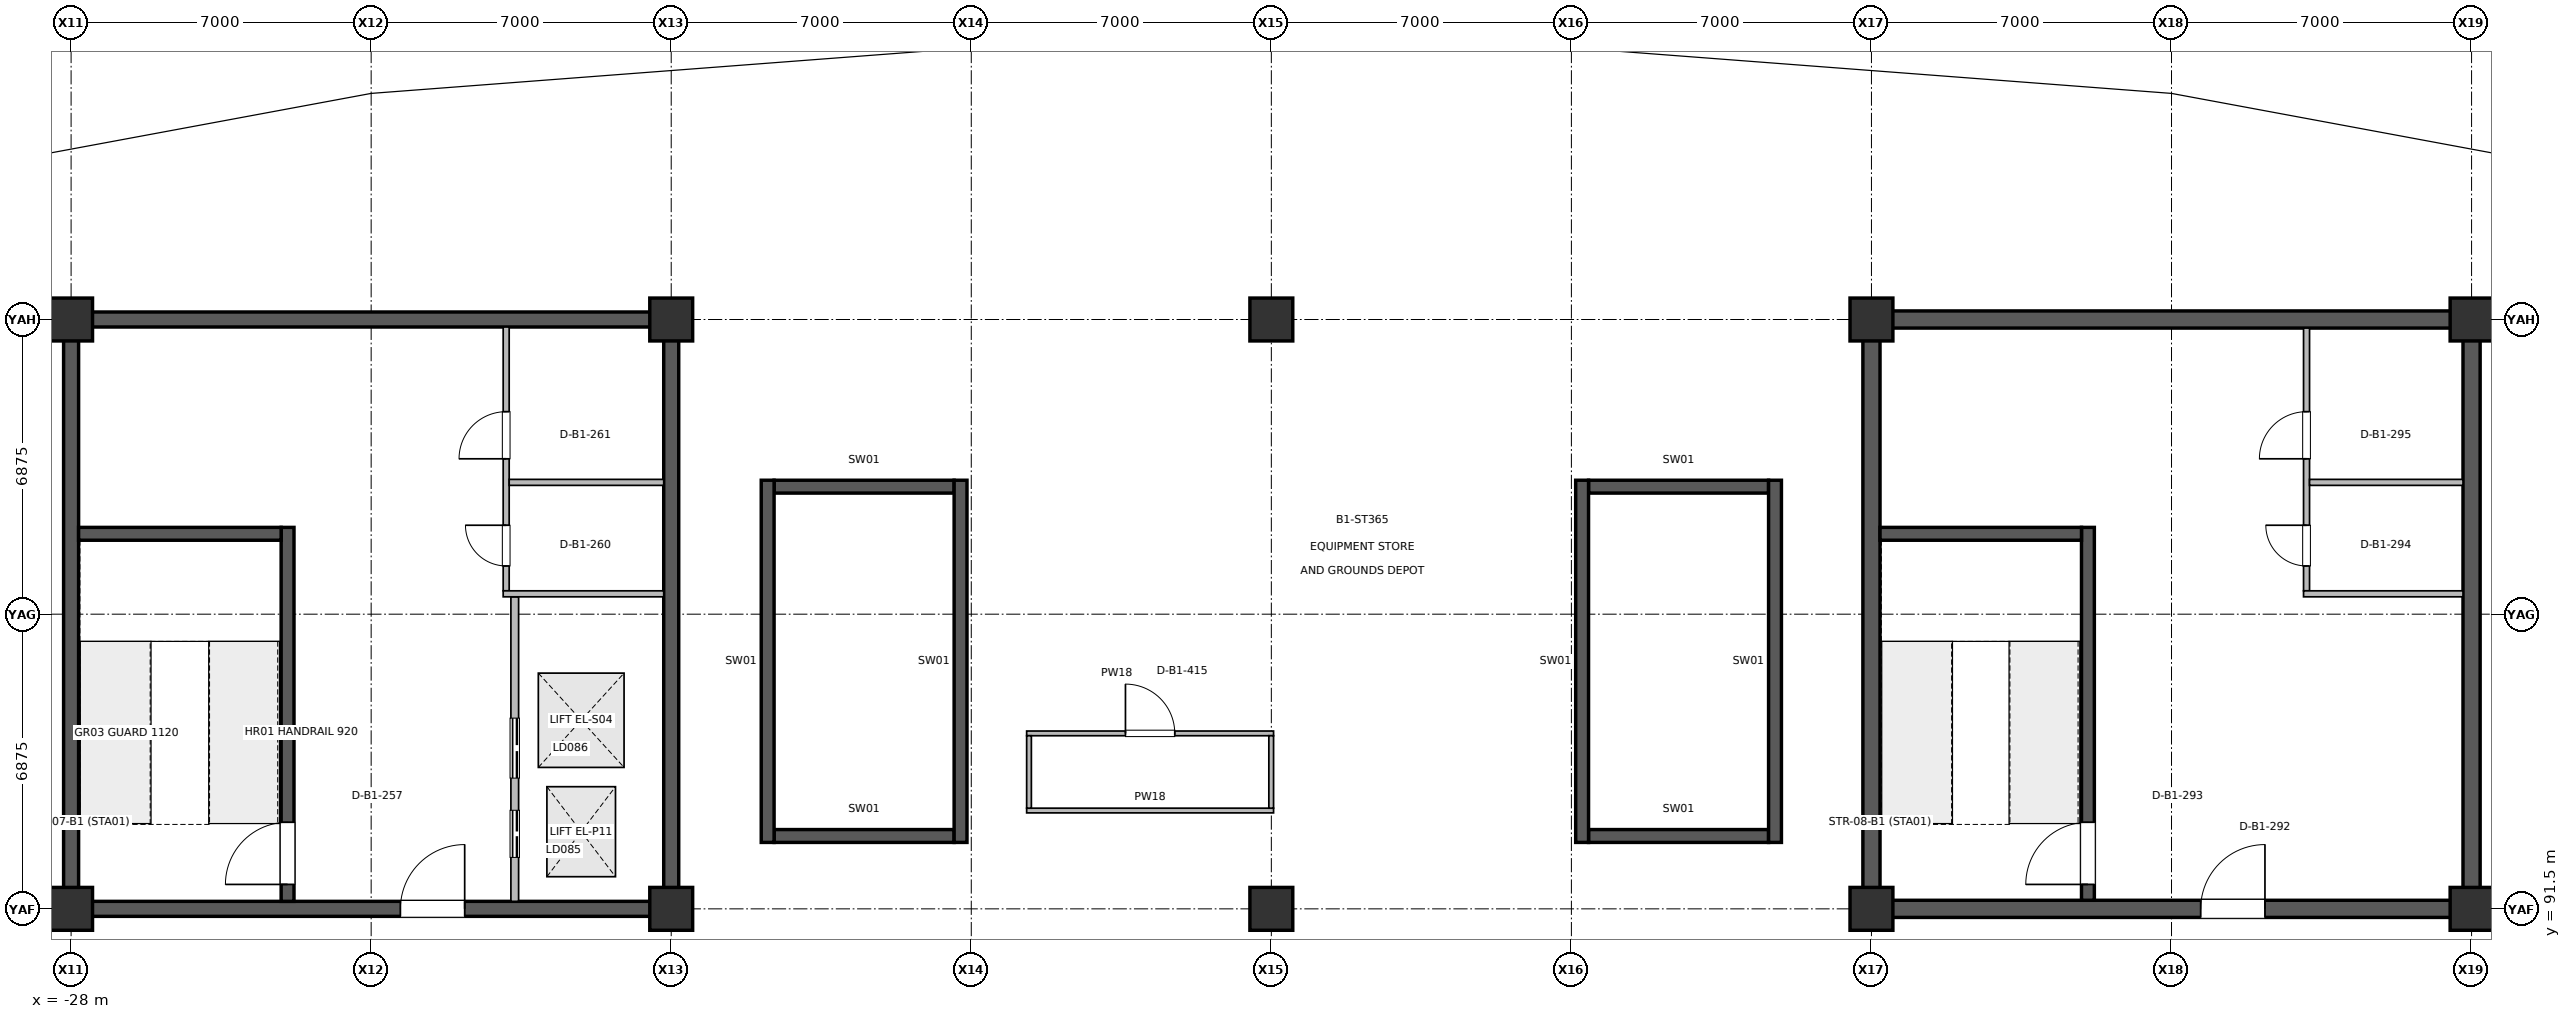
"""IFC4 building model, lengths in metres.
Left out: names, types, materials, properties, quantities, classifications, styles, units other than length and angle.
Written with IfcOpenShell. Run it as: python <this file> out.ifc"""

import sys

from ifc_helpers import new_model, si_unit, direction, frame, frame_2d, origin, origin_2d, place, context, subcontext, project, spatial, rectangle, circle, extrude, element, fill, save


model = new_model("IFC4")
c1 = context("Model", 3, precision=1e-05, world=origin(), true_north=direction((0.0, 1.0)))
c2 = subcontext(c1, "Body", "Model", "MODEL_VIEW")
j1 = project(units=[si_unit("LENGTHUNIT", "METRE"), si_unit("PLANEANGLEUNIT", "RADIAN")], contexts=[c1])
p1 = place(None, origin())
s1 = spatial("IfcSite", under=j1, at=p1, CompositionType="ELEMENT")
p2 = place(p1, origin())
s2 = spatial("IfcBuilding", under=s1, at=p2, CompositionType="ELEMENT")
p3 = place(p2, frame((0.0, 0.0, -6.0)))
s3 = spatial("IfcBuildingStorey", under=s2, at=p3, CompositionType="ELEMENT", Elevation=-6.0)
for number, where, z_axis, x_axis in (
    (1, (-28.0, 91.5, 0.0), (0.0, 0.0, 1.0), (1.0, 0.0, 0.0)),
    (2, (-28.0, 105.25, 0.0), (0.0, 0.0, 1.0), (1.0, 0.0, 0.0)),
    (3, (-14.0, 91.5, 0.0), (0.0, 0.0, 1.0), (1.0, 0.0, 0.0)),
    (4, (-14.0, 105.25, 0.0), (0.0, 0.0, 1.0), (1.0, 0.0, 0.0)),
    (5, (0.0, 91.5, 0.0), (0.0, 0.0, 1.0), (1.0, 0.0, 0.0)),
    (6, (0.0, 105.25, 0.0), (0.0, 0.0, 1.0), (1.0, 0.0, 0.0)),
    (7, (14.0, 91.5, 0.0), (0.0, 0.0, 1.0), (1.0, 0.0, 0.0)),
    (8, (14.0, 105.25, 0.0), (0.0, 0.0, 1.0), (1.0, 0.0, 0.0)),
    (9, (28.0, 91.5, 0.0), (0.0, 0.0, 1.0), (1.0, 0.0, 0.0)),
    (10, (28.0, 105.25, 0.0), (0.0, 0.0, 1.0), (1.0, 0.0, 0.0)),
):
    element("IfcColumn", number, at=place(p3, frame(where, z_axis=z_axis, x_axis=x_axis)), inside=s3, PredefinedType="COLUMN", context=c2, shape_type="SweptSolid", body=[
        extrude(circle(Radius=0.5, at=origin_2d()), origin(), (0.0, 0.0, 1.0), 5.998),
    ])
for number, where, z_axis, x_axis in (
    (11, (-28.0, 91.675, 0.0), (0.0, 0.0, 1.0), (0.0, 1.0, 0.0)),
    (12, (-14.0, 91.675, 0.0), (0.0, 0.0, 1.0), (0.0, 1.0, 0.0)),
):
    element("IfcWall", number, at=place(p3, frame(where, z_axis=z_axis, x_axis=x_axis)), inside=s3, PredefinedType="SHEAR", context=c2, shape_type="SweptSolid", body=[
        extrude(rectangle(XDim=13.4, YDim=0.35, at=frame_2d((6.7, 0.0))), origin(), (0.0, 0.0, 1.0), 5.75),
    ])
p4 = place(p3, frame((-27.825, 91.5, 0.0), z_axis=(0.0, 0.0, 1.0), x_axis=(1.0, 0.0, 0.0)))
e13 = element("IfcWall", 13, at=p4, inside=s3, PredefinedType="SHEAR", context=c2, shape_type="SweptSolid", body=[
    extrude(rectangle(XDim=13.65, YDim=0.35, at=frame_2d((6.825, 0.0))), origin(), (0.0, 0.0, 1.0), 5.75),
])
p5 = place(p4, frame((7.507, 0.0, 0.0)))
e14 = element("IfcOpeningElement", 14, at=p5, cuts=e13, PredefinedType="OPENING", context=c2, shape_type="SweptSolid", body=[
    extrude(rectangle(XDim=1.5, YDim=2.2, at=frame_2d((0.75, 1.1))), frame((0.0, 0.185, 0.0), z_axis=(0.0, -1.0, 0.0), x_axis=(1.0, 0.0, 0.0)), (0.0, 0.0, 1.0), 0.37),
])
p6 = place(p3, frame((-27.825, 105.25, 0.0), z_axis=(0.0, 0.0, 1.0), x_axis=(1.0, 0.0, 0.0)))
e15 = element("IfcWall", 15, at=p6, inside=s3, PredefinedType="SHEAR", context=c2, shape_type="SweptSolid", body=[
    extrude(rectangle(XDim=13.65, YDim=0.35, at=frame_2d((6.825, 0.0))), origin(), (0.0, 0.0, 1.0), 5.75),
])
for number, where, z_axis, x_axis in (
    (16, (14.0, 91.7, 0.0), (0.0, 0.0, 1.0), (0.0, 1.0, 0.0)),
    (17, (28.0, 91.7, 0.0), (0.0, 0.0, 1.0), (0.0, 1.0, 0.0)),
):
    element("IfcWall", number, at=place(p3, frame(where, z_axis=z_axis, x_axis=x_axis)), inside=s3, PredefinedType="SHEAR", context=c2, shape_type="SweptSolid", body=[
        extrude(rectangle(XDim=13.35, YDim=0.4, at=frame_2d((6.675, 0.0))), origin(), (0.0, 0.0, 1.0), 5.75),
    ])
p7 = place(p3, frame((14.2, 91.5, 0.0), z_axis=(0.0, 0.0, 1.0), x_axis=(1.0, 0.0, 0.0)))
e18 = element("IfcWall", 18, at=p7, inside=s3, PredefinedType="SHEAR", context=c2, shape_type="SweptSolid", body=[
    extrude(rectangle(XDim=13.6, YDim=0.4, at=frame_2d((6.8, 0.0))), origin(), (0.0, 0.0, 1.0), 5.75),
])
p8 = place(p7, frame((7.48, 0.0, 0.0)))
e19 = element("IfcOpeningElement", 19, at=p8, cuts=e18, PredefinedType="OPENING", context=c2, shape_type="SweptSolid", body=[
    extrude(rectangle(XDim=1.5, YDim=2.2, at=frame_2d((0.75, 1.1))), frame((0.0, 0.21, 0.0), z_axis=(0.0, -1.0, 0.0), x_axis=(1.0, 0.0, 0.0)), (0.0, 0.0, 1.0), 0.42),
])
p9 = place(p3, frame((14.2, 105.25, 0.0), z_axis=(0.0, 0.0, 1.0), x_axis=(1.0, 0.0, 0.0)))
e20 = element("IfcWall", 20, at=p9, inside=s3, PredefinedType="SHEAR", context=c2, shape_type="SweptSolid", body=[
    extrude(rectangle(XDim=13.6, YDim=0.4, at=frame_2d((6.8, 0.0))), origin(), (0.0, 0.0, 1.0), 5.75),
])
p10 = place(p3, frame((-22.95, 91.675, 0.0), z_axis=(0.0, 0.0, 1.0), x_axis=(0.0, 1.0, 0.0)))
e21 = element("IfcWall", 21, at=p10, inside=s3, PredefinedType="SHEAR", context=c2, shape_type="SweptSolid", body=[
    extrude(rectangle(XDim=8.725, YDim=0.3, at=frame_2d((4.362, 0.0))), origin(), (0.0, 0.0, 1.0), 5.75),
])
p11 = place(p10, frame((0.395, 0.0, 0.0)))
e22 = element("IfcOpeningElement", 22, at=p11, cuts=e21, PredefinedType="OPENING", context=c2, shape_type="SweptSolid", body=[
    extrude(rectangle(XDim=1.45, YDim=2.2, at=frame_2d((0.725, 1.1))), frame((0.0, 0.16, 0.0), z_axis=(0.0, -1.0, 0.0), x_axis=(1.0, 0.0, 0.0)), (0.0, 0.0, 1.0), 0.32),
])
p12 = place(p3, frame((-17.65, 91.675, 0.0), z_axis=(0.0, 0.0, 1.0), x_axis=(0.0, 1.0, 0.0)))
e23 = element("IfcWall", 23, at=p12, inside=s3, PredefinedType="PARTITIONING", context=c2, shape_type="SweptSolid", body=[
    extrude(rectangle(XDim=7.105, YDim=0.18, at=frame_2d((3.552, 0.0))), origin(), (0.0, 0.0, 1.0), 5.02),
])
p13 = place(p12, frame((1.025, 0.0, 0.0)))
e24 = element("IfcOpeningElement", 24, at=p13, cuts=e23, PredefinedType="OPENING", context=c2, shape_type="SweptSolid", body=[
    extrude(rectangle(XDim=1.1, YDim=2.2, at=frame_2d((0.55, 1.1))), frame((0.0, 0.1, 0.0), z_axis=(0.0, -1.0, 0.0), x_axis=(1.0, 0.0, 0.0)), (0.0, 0.0, 1.0), 0.2),
])
p14 = place(p12, frame((2.875, 0.0, 0.0)))
e25 = element("IfcOpeningElement", 25, at=p14, cuts=e23, PredefinedType="OPENING", context=c2, shape_type="SweptSolid", body=[
    extrude(rectangle(XDim=1.4, YDim=2.3, at=frame_2d((0.7, 1.15))), frame((0.0, 0.1, 0.0), z_axis=(0.0, -1.0, 0.0), x_axis=(1.0, 0.0, 0.0)), (0.0, 0.0, 1.0), 0.2),
])
p15 = place(p3, frame((-17.85, 98.92, 0.0), z_axis=(0.0, 0.0, 1.0), x_axis=(0.0, 1.0, 0.0)))
e26 = element("IfcWall", 26, at=p15, inside=s3, PredefinedType="PARTITIONING", context=c2, shape_type="SweptSolid", body=[
    extrude(rectangle(XDim=6.155, YDim=0.14, at=frame_2d((3.078, 0.0))), origin(), (0.0, 0.0, 1.0), 5.02),
])
p16 = place(p15, frame((0.58, 0.0, 0.0)))
e27 = element("IfcOpeningElement", 27, at=p16, cuts=e26, PredefinedType="OPENING", context=c2, shape_type="SweptSolid", body=[
    extrude(rectangle(XDim=0.95, YDim=2.15, at=frame_2d((0.475, 1.075))), frame((0.0, 0.08, 0.0), z_axis=(0.0, -1.0, 0.0), x_axis=(1.0, 0.0, 0.0)), (0.0, 0.0, 1.0), 0.16),
])
p17 = place(p15, frame((3.08, 0.0, 0.0)))
e28 = element("IfcOpeningElement", 28, at=p17, cuts=e26, PredefinedType="OPENING", context=c2, shape_type="SweptSolid", body=[
    extrude(rectangle(XDim=1.1, YDim=2.15, at=frame_2d((0.55, 1.075))), frame((0.0, 0.08, 0.0), z_axis=(0.0, -1.0, 0.0), x_axis=(1.0, 0.0, 0.0)), (0.0, 0.0, 1.0), 0.16),
])
p18 = place(p3, frame((19.05, 91.7, 0.0), z_axis=(0.0, 0.0, 1.0), x_axis=(0.0, 1.0, 0.0)))
e29 = element("IfcWall", 29, at=p18, inside=s3, PredefinedType="SHEAR", context=c2, shape_type="SweptSolid", body=[
    extrude(rectangle(XDim=8.7, YDim=0.3, at=frame_2d((4.35, 0.0))), origin(), (0.0, 0.0, 1.0), 5.75),
])
p19 = place(p18, frame((0.37, 0.0, 0.0)))
e30 = element("IfcOpeningElement", 30, at=p19, cuts=e29, PredefinedType="OPENING", context=c2, shape_type="SweptSolid", body=[
    extrude(rectangle(XDim=1.45, YDim=2.2, at=frame_2d((0.725, 1.1))), frame((0.0, 0.16, 0.0), z_axis=(0.0, -1.0, 0.0), x_axis=(1.0, 0.0, 0.0)), (0.0, 0.0, 1.0), 0.32),
])
p20 = place(p3, frame((24.15, 98.92, 0.0), z_axis=(0.0, 0.0, 1.0), x_axis=(0.0, 1.0, 0.0)))
e31 = element("IfcWall", 31, at=p20, inside=s3, PredefinedType="PARTITIONING", context=c2, shape_type="SweptSolid", body=[
    extrude(rectangle(XDim=6.13, YDim=0.14, at=frame_2d((3.065, 0.0))), origin(), (0.0, 0.0, 1.0), 5.02),
])
p21 = place(p20, frame((0.58, 0.0, 0.0)))
e32 = element("IfcOpeningElement", 32, at=p21, cuts=e31, PredefinedType="OPENING", context=c2, shape_type="SweptSolid", body=[
    extrude(rectangle(XDim=0.95, YDim=2.15, at=frame_2d((0.475, 1.075))), frame((0.0, 0.08, 0.0), z_axis=(0.0, -1.0, 0.0), x_axis=(1.0, 0.0, 0.0)), (0.0, 0.0, 1.0), 0.16),
])
p22 = place(p20, frame((3.08, 0.0, 0.0)))
e33 = element("IfcOpeningElement", 33, at=p22, cuts=e31, PredefinedType="OPENING", context=c2, shape_type="SweptSolid", body=[
    extrude(rectangle(XDim=1.1, YDim=2.15, at=frame_2d((0.55, 1.075))), frame((0.0, 0.08, 0.0), z_axis=(0.0, -1.0, 0.0), x_axis=(1.0, 0.0, 0.0)), (0.0, 0.0, 1.0), 0.16),
])
p23 = place(p3, frame((-5.708, 95.594, 0.0), z_axis=(0.0, 0.0, 1.0), x_axis=(1.0, 0.0, 0.0)))
e34 = element("IfcWall", 34, at=p23, inside=s3, PredefinedType="PARTITIONING", context=c2, shape_type="SweptSolid", body=[
    extrude(rectangle(XDim=5.76, YDim=0.11, at=frame_2d((2.88, 0.0))), origin(), (0.0, 0.0, 1.0), 5.02),
])
p24 = place(p23, frame((2.305, 0.0, 0.0)))
e35 = element("IfcOpeningElement", 35, at=p24, cuts=e34, PredefinedType="OPENING", context=c2, shape_type="SweptSolid", body=[
    extrude(rectangle(XDim=1.15, YDim=2.2, at=frame_2d((0.575, 1.1))), frame((0.0, 0.065, 0.0), z_axis=(0.0, -1.0, 0.0), x_axis=(1.0, 0.0, 0.0)), (0.0, 0.0, 1.0), 0.13),
])
p25 = place(p3, frame((-17.92, 98.85, 0.0), z_axis=(0.0, 0.0, 1.0), x_axis=(1.0, 0.0, 0.0)))
e36 = element("IfcWall", 36, at=p25, inside=s3, PredefinedType="PARTITIONING", context=c2, shape_type="SweptSolid", body=[
    extrude(rectangle(XDim=3.745, YDim=0.14, at=frame_2d((1.873, 0.0))), origin(), (0.0, 0.0, 1.0), 5.02),
])
p26 = place(p3, frame((-17.78, 101.45, 0.0), z_axis=(0.0, 0.0, 1.0), x_axis=(1.0, 0.0, 0.0)))
e37 = element("IfcWall", 37, at=p26, inside=s3, PredefinedType="PARTITIONING", context=c2, shape_type="SweptSolid", body=[
    extrude(rectangle(XDim=3.605, YDim=0.14, at=frame_2d((1.802, 0.0))), origin(), (0.0, 0.0, 1.0), 5.02),
])
p27 = place(p3, frame((24.08, 98.85, 0.0), z_axis=(0.0, 0.0, 1.0), x_axis=(1.0, 0.0, 0.0)))
e38 = element("IfcWall", 38, at=p27, inside=s3, PredefinedType="PARTITIONING", context=c2, shape_type="SweptSolid", body=[
    extrude(rectangle(XDim=3.72, YDim=0.14, at=frame_2d((1.86, 0.0))), origin(), (0.0, 0.0, 1.0), 5.02),
])
p28 = place(p3, frame((24.22, 101.45, 0.0), z_axis=(0.0, 0.0, 1.0), x_axis=(1.0, 0.0, 0.0)))
e39 = element("IfcWall", 39, at=p28, inside=s3, PredefinedType="PARTITIONING", context=c2, shape_type="SweptSolid", body=[
    extrude(rectangle(XDim=3.58, YDim=0.14, at=frame_2d((1.79, 0.0))), origin(), (0.0, 0.0, 1.0), 5.02),
])
p29 = place(p3, frame((-5.708, 93.794, 0.0), z_axis=(0.0, 0.0, 1.0), x_axis=(1.0, 0.0, 0.0)))
e40 = element("IfcWall", 40, at=p29, inside=s3, PredefinedType="PARTITIONING", context=c2, shape_type="SweptSolid", body=[
    extrude(rectangle(XDim=5.76, YDim=0.11, at=frame_2d((2.88, 0.0))), origin(), (0.0, 0.0, 1.0), 5.02),
])
for number, where, z_axis, x_axis in (
    (41, (-5.653, 93.849, 0.0), (0.0, 0.0, 1.0), (0.0, 1.0, 0.0)),
    (42, (-0.003, 93.849, 0.0), (0.0, 0.0, 1.0), (0.0, 1.0, 0.0)),
):
    element("IfcWall", number, at=place(p3, frame(where, z_axis=z_axis, x_axis=x_axis)), inside=s3, PredefinedType="PARTITIONING", context=c2, shape_type="SweptSolid", body=[
        extrude(rectangle(XDim=1.69, YDim=0.11, at=frame_2d((0.845, 0.0))), origin(), (0.0, 0.0, 1.0), 5.02),
    ])
p30 = place(p3, frame((-27.825, 100.25, 0.0), z_axis=(0.0, 0.0, 1.0), x_axis=(1.0, 0.0, 0.0)))
e43 = element("IfcWall", 43, at=p30, inside=s3, PredefinedType="SHEAR", context=c2, shape_type="SweptSolid", body=[
    extrude(rectangle(XDim=4.725, YDim=0.3, at=frame_2d((2.362, 0.0))), origin(), (0.0, 0.0, 1.0), 5.75),
])
p31 = place(p3, frame((14.2, 100.25, 0.0), z_axis=(0.0, 0.0, 1.0), x_axis=(1.0, 0.0, 0.0)))
e44 = element("IfcWall", 44, at=p31, inside=s3, PredefinedType="SHEAR", context=c2, shape_type="SweptSolid", body=[
    extrude(rectangle(XDim=4.7, YDim=0.3, at=frame_2d((2.35, 0.0))), origin(), (0.0, 0.0, 1.0), 5.75),
])
for number, where, z_axis, x_axis in (
    (45, (-11.6, 93.2, 0.0), (0.0, 0.0, 1.0), (1.0, 0.0, 0.0)),
    (46, (-11.6, 101.35, 0.0), (0.0, 0.0, 1.0), (1.0, 0.0, 0.0)),
):
    element("IfcWall", number, at=place(p3, frame(where, z_axis=z_axis, x_axis=x_axis)), inside=s3, PredefinedType="SHEAR", context=c2, shape_type="SweptSolid", body=[
        extrude(rectangle(XDim=4.2, YDim=0.3, at=frame_2d((2.1, 0.0))), origin(), (0.0, 0.0, 1.0), 5.75),
    ])
for number, where, z_axis, x_axis in (
    (47, (-11.75, 93.05, 0.0), (0.0, 0.0, 1.0), (0.0, 1.0, 0.0)),
    (48, (-7.25, 93.05, 0.0), (0.0, 0.0, 1.0), (0.0, 1.0, 0.0)),
):
    element("IfcWall", number, at=place(p3, frame(where, z_axis=z_axis, x_axis=x_axis)), inside=s3, PredefinedType="SHEAR", context=c2, shape_type="SweptSolid", body=[
        extrude(rectangle(XDim=8.45, YDim=0.3, at=frame_2d((4.225, 0.0))), origin(), (0.0, 0.0, 1.0), 5.75),
    ])
for number, where, z_axis, x_axis in (
    (49, (7.4, 93.2, 0.0), (0.0, 0.0, 1.0), (1.0, 0.0, 0.0)),
    (50, (7.4, 101.35, 0.0), (0.0, 0.0, 1.0), (1.0, 0.0, 0.0)),
):
    element("IfcWall", number, at=place(p3, frame(where, z_axis=z_axis, x_axis=x_axis)), inside=s3, PredefinedType="SHEAR", context=c2, shape_type="SweptSolid", body=[
        extrude(rectangle(XDim=4.2, YDim=0.3, at=frame_2d((2.1, 0.0))), origin(), (0.0, 0.0, 1.0), 5.75),
    ])
for number, where, z_axis, x_axis in (
    (51, (7.25, 93.05, 0.0), (0.0, 0.0, 1.0), (0.0, 1.0, 0.0)),
    (52, (11.75, 93.05, 0.0), (0.0, 0.0, 1.0), (0.0, 1.0, 0.0)),
):
    element("IfcWall", number, at=place(p3, frame(where, z_axis=z_axis, x_axis=x_axis)), inside=s3, PredefinedType="SHEAR", context=c2, shape_type="SweptSolid", body=[
        extrude(rectangle(XDim=8.45, YDim=0.3, at=frame_2d((4.225, 0.0))), origin(), (0.0, 0.0, 1.0), 5.75),
    ])
p32 = place(p5, origin())
e53 = element("IfcDoor", 53, at=p32, inside=s3, OperationType="SINGLE_SWING_RIGHT", PredefinedType="DOOR", context=c2, shape_type="SweptSolid", body=[
    extrude(rectangle(XDim=1.5, YDim=2.2, at=frame_2d((0.75, 1.1))), frame((0.0, 0.025, 0.0), z_axis=(0.0, -1.0, 0.0), x_axis=(1.0, 0.0, 0.0)), (0.0, 0.0, 1.0), 0.05),
])
fill(e14, e53)
p33 = place(p11, origin())
e54 = element("IfcDoor", 54, at=p33, inside=s3, OperationType="SINGLE_SWING_LEFT", PredefinedType="DOOR", context=c2, shape_type="SweptSolid", body=[
    extrude(rectangle(XDim=1.45, YDim=2.2, at=frame_2d((0.725, 1.1))), frame((0.0, 0.025, 0.0), z_axis=(0.0, -1.0, 0.0), x_axis=(1.0, 0.0, 0.0)), (0.0, 0.0, 1.0), 0.05),
])
fill(e22, e54)
p34 = place(p13, origin())
e55 = element("IfcDoor", 55, at=p34, inside=s3, OperationType="DOUBLE_DOOR_SLIDING", PredefinedType="DOOR", context=c2, shape_type="SweptSolid", body=[
    extrude(rectangle(XDim=1.1, YDim=2.2, at=frame_2d((0.55, 1.1))), frame((0.0, 0.025, 0.0), z_axis=(0.0, -1.0, 0.0), x_axis=(1.0, 0.0, 0.0)), (0.0, 0.0, 1.0), 0.05),
])
fill(e24, e55)
p35 = place(p14, origin())
e56 = element("IfcDoor", 56, at=p35, inside=s3, OperationType="DOUBLE_DOOR_SLIDING", PredefinedType="DOOR", context=c2, shape_type="SweptSolid", body=[
    extrude(rectangle(XDim=1.4, YDim=2.3, at=frame_2d((0.7, 1.15))), frame((0.0, 0.025, 0.0), z_axis=(0.0, -1.0, 0.0), x_axis=(1.0, 0.0, 0.0)), (0.0, 0.0, 1.0), 0.05),
])
fill(e25, e56)
p36 = place(p16, origin())
e57 = element("IfcDoor", 57, at=p36, inside=s3, OperationType="SINGLE_SWING_RIGHT", PredefinedType="DOOR", context=c2, shape_type="SweptSolid", body=[
    extrude(rectangle(XDim=0.95, YDim=2.15, at=frame_2d((0.475, 1.075))), frame((0.0, 0.025, 0.0), z_axis=(0.0, -1.0, 0.0), x_axis=(1.0, 0.0, 0.0)), (0.0, 0.0, 1.0), 0.05),
])
fill(e27, e57)
p37 = place(p17, origin())
e58 = element("IfcDoor", 58, at=p37, inside=s3, OperationType="SINGLE_SWING_LEFT", PredefinedType="DOOR", context=c2, shape_type="SweptSolid", body=[
    extrude(rectangle(XDim=1.1, YDim=2.15, at=frame_2d((0.55, 1.075))), frame((0.0, 0.025, 0.0), z_axis=(0.0, -1.0, 0.0), x_axis=(1.0, 0.0, 0.0)), (0.0, 0.0, 1.0), 0.05),
])
fill(e28, e58)
p38 = place(p8, origin())
e59 = element("IfcDoor", 59, at=p38, inside=s3, OperationType="SINGLE_SWING_RIGHT", PredefinedType="DOOR", context=c2, shape_type="SweptSolid", body=[
    extrude(rectangle(XDim=1.5, YDim=2.2, at=frame_2d((0.75, 1.1))), frame((0.0, 0.025, 0.0), z_axis=(0.0, -1.0, 0.0), x_axis=(1.0, 0.0, 0.0)), (0.0, 0.0, 1.0), 0.05),
])
fill(e19, e59)
p39 = place(p19, origin())
e60 = element("IfcDoor", 60, at=p39, inside=s3, OperationType="SINGLE_SWING_LEFT", PredefinedType="DOOR", context=c2, shape_type="SweptSolid", body=[
    extrude(rectangle(XDim=1.45, YDim=2.2, at=frame_2d((0.725, 1.1))), frame((0.0, 0.025, 0.0), z_axis=(0.0, -1.0, 0.0), x_axis=(1.0, 0.0, 0.0)), (0.0, 0.0, 1.0), 0.05),
])
fill(e30, e60)
p40 = place(p21, origin())
e61 = element("IfcDoor", 61, at=p40, inside=s3, OperationType="SINGLE_SWING_RIGHT", PredefinedType="DOOR", context=c2, shape_type="SweptSolid", body=[
    extrude(rectangle(XDim=0.95, YDim=2.15, at=frame_2d((0.475, 1.075))), frame((0.0, 0.025, 0.0), z_axis=(0.0, -1.0, 0.0), x_axis=(1.0, 0.0, 0.0)), (0.0, 0.0, 1.0), 0.05),
])
fill(e32, e61)
p41 = place(p22, origin())
e62 = element("IfcDoor", 62, at=p41, inside=s3, OperationType="SINGLE_SWING_LEFT", PredefinedType="DOOR", context=c2, shape_type="SweptSolid", body=[
    extrude(rectangle(XDim=1.1, YDim=2.15, at=frame_2d((0.55, 1.075))), frame((0.0, 0.025, 0.0), z_axis=(0.0, -1.0, 0.0), x_axis=(1.0, 0.0, 0.0)), (0.0, 0.0, 1.0), 0.05),
])
fill(e33, e62)
p42 = place(p24, origin())
e63 = element("IfcDoor", 63, at=p42, inside=s3, OperationType="SINGLE_SWING_LEFT", PredefinedType="DOOR", context=c2, shape_type="SweptSolid", body=[
    extrude(rectangle(XDim=1.15, YDim=2.2, at=frame_2d((0.575, 1.1))), frame((0.0, 0.025, 0.0), z_axis=(0.0, -1.0, 0.0), x_axis=(1.0, 0.0, 0.0)), (0.0, 0.0, 1.0), 0.05),
])
fill(e35, e63)
save(model, sys.argv[1])
